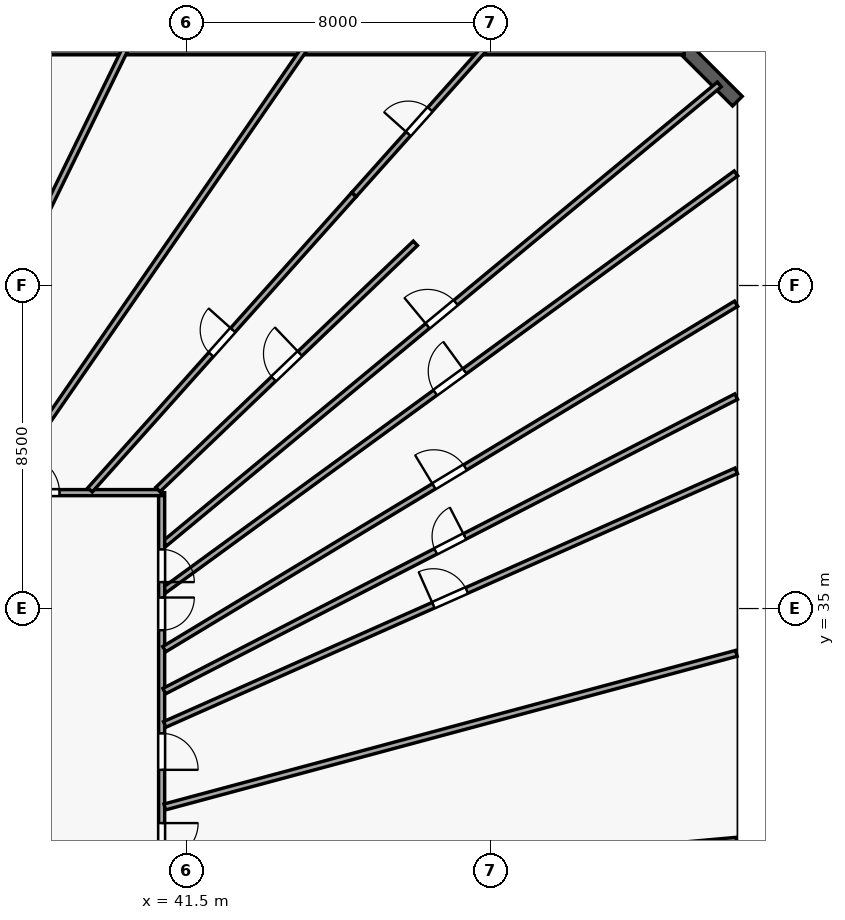
"""IFC4 building model, lengths in metres.
Left out: names, types, materials, properties, quantities, classifications, styles, units other than length and angle.
Written with IfcOpenShell. Run it as: python <this file> out.ifc"""

import sys

from ifc_helpers import new_model, si_unit, direction, frame, frame_2d, origin, origin_with_axes, origin_2d, place, context, subcontext, project, spatial, rectangle, circle, extrude, source, transform, mapped, element, fill, save


model = new_model("IFC4")
c1 = context("Model", 3, precision=1e-05, world=origin(), true_north=direction((0.0, 1.0)))
c2 = subcontext(c1, "Body", "Model", "MODEL_VIEW")
j1 = project(units=[si_unit("LENGTHUNIT", "METRE"), si_unit("PLANEANGLEUNIT", "RADIAN")], contexts=[c1])
p1 = place(None, origin())
s1 = spatial("IfcSite", under=j1, at=p1, CompositionType="ELEMENT")
p2 = place(p1, origin())
s2 = spatial("IfcBuilding", under=s1, at=p2, CompositionType="ELEMENT")
p3 = place(p2, frame((0.0, 0.0, 9.0)))
s3 = spatial("IfcBuildingStorey", under=s2, at=p3, CompositionType="ELEMENT", Elevation=9.0)
m1 = source(origin_with_axes(), c2, "Body", "SweptSolid", [
    extrude(circle(Radius=0.9, at=origin_2d()), origin(), (0.0, 0.0, 1.0), 4.5),
])
p4 = place(p3, frame((37.5, 34.7, 0.0), z_axis=(0.0, 0.0, 1.0), x_axis=(1.0, 0.0, 0.0)))
e1 = element("IfcColumn", 1, at=p4, inside=s3, PredefinedType="COLUMN", context=c2, shape_type="MappedRepresentation", body=[
    mapped(m1, transform((0.0, 0.0, 0.0), scale=1.0)),
])
m2 = source(origin_with_axes(), c2, "Body", "SweptSolid", [
    extrude(circle(Radius=0.8, at=origin_2d()), origin(), (0.0, 0.0, 1.0), 4.5),
])
p5 = place(p3, frame((46.8, 45.5, 0.0), z_axis=(0.0, 0.0, 1.0), x_axis=(1.0, 0.0, 0.0)))
e2 = element("IfcColumn", 2, at=p5, inside=s3, PredefinedType="COLUMN", context=c2, shape_type="MappedRepresentation", body=[
    mapped(m2, transform((0.0, 0.0, 0.0), scale=1.0)),
])
m3 = source(origin_with_axes(), c2, "Body", "SweptSolid", [
    extrude(rectangle(XDim=0.6, YDim=0.9, at=origin_2d()), origin(), (0.0, 0.0, 1.0), 4.5),
])
for number, where, z_axis, x_axis in (
    (3, (54.8, 34.5, 0.0), (0.0, 0.0, 1.0), (1.0, 0.0, 0.0)),
    (4, (54.8, 42.5, 0.0), (0.0, 0.0, 1.0), (1.0, 0.0, 0.0)),
):
    element("IfcColumn", number, at=place(p3, frame(where, z_axis=z_axis, x_axis=x_axis)), inside=s3, PredefinedType="PILASTER", context=c2, shape_type="MappedRepresentation", body=[
        mapped(m3, transform((0.0, 0.0, 0.0), scale=1.0)),
    ])
p6 = place(p3, frame((56.0, 48.35, 0.0), z_axis=(0.0, 0.0, 1.0), x_axis=(-0.707106781187, 0.707106781187, 0.0)))
e5 = element("IfcWall", 5, at=p6, inside=s3, PredefinedType="SOLIDWALL", context=c2, shape_type="SweptSolid", body=[
    extrude(rectangle(XDim=1.98, YDim=0.36, at=frame_2d((0.99, 0.0))), origin(), (0.0, 0.0, 1.0), 4.2),
])
p7 = place(p3, frame((54.6, 49.75, 0.0), z_axis=(0.0, 0.0, 1.0), x_axis=(-1.0, 0.0, 0.0)))
e6 = element("IfcWall", 6, at=p7, inside=s3, PredefinedType="SOLIDWALL", context=c2, shape_type="SweptSolid", body=[
    extrude(rectangle(XDim=49.25, YDim=0.36, at=frame_2d((24.625, 0.0))), origin(), (0.0, 0.0, 1.0), 4.2),
])
p8 = place(p7, frame((1.866, 0.0, 0.85)))
e7 = element("IfcOpeningElement", 7, at=p8, cuts=e6, PredefinedType="OPENING", context=c2, shape_type="SweptSolid", body=[
    extrude(rectangle(XDim=1.8, YDim=2.2, at=frame_2d((0.9, 1.1))), frame((0.0, 0.19, 0.0), z_axis=(0.0, -1.0, 0.0), x_axis=(1.0, 0.0, 0.0)), (0.0, 0.0, 1.0), 0.38),
])
p9 = place(p7, frame((6.763, 0.0, 0.85)))
e8 = element("IfcOpeningElement", 8, at=p9, cuts=e6, PredefinedType="OPENING", context=c2, shape_type="SweptSolid", body=[
    extrude(rectangle(XDim=1.8, YDim=2.2, at=frame_2d((0.9, 1.1))), frame((0.0, 0.19, 0.0), z_axis=(0.0, -1.0, 0.0), x_axis=(1.0, 0.0, 0.0)), (0.0, 0.0, 1.0), 0.38),
])
p10 = place(p7, frame((11.474, 0.0, 0.85)))
e9 = element("IfcOpeningElement", 9, at=p10, cuts=e6, PredefinedType="OPENING", context=c2, shape_type="SweptSolid", body=[
    extrude(rectangle(XDim=1.8, YDim=2.2, at=frame_2d((0.9, 1.1))), frame((0.0, 0.19, 0.0), z_axis=(0.0, -1.0, 0.0), x_axis=(1.0, 0.0, 0.0)), (0.0, 0.0, 1.0), 0.38),
])
p11 = place(p7, frame((16.083, 0.0, 0.85)))
e10 = element("IfcOpeningElement", 10, at=p11, cuts=e6, PredefinedType="OPENING", context=c2, shape_type="SweptSolid", body=[
    extrude(rectangle(XDim=1.8, YDim=2.2, at=frame_2d((0.9, 1.1))), frame((0.0, 0.19, 0.0), z_axis=(0.0, -1.0, 0.0), x_axis=(1.0, 0.0, 0.0)), (0.0, 0.0, 1.0), 0.38),
])
p12 = place(p7, frame((20.595, 0.0, 0.85)))
e11 = element("IfcOpeningElement", 11, at=p12, cuts=e6, PredefinedType="OPENING", context=c2, shape_type="SweptSolid", body=[
    extrude(rectangle(XDim=1.8, YDim=2.2, at=frame_2d((0.9, 1.1))), frame((0.0, 0.19, 0.0), z_axis=(0.0, -1.0, 0.0), x_axis=(1.0, 0.0, 0.0)), (0.0, 0.0, 1.0), 0.38),
])
p13 = place(p7, frame((24.23, 0.0, 0.85)))
e12 = element("IfcOpeningElement", 12, at=p13, cuts=e6, PredefinedType="OPENING", context=c2, shape_type="SweptSolid", body=[
    extrude(rectangle(XDim=1.8, YDim=2.2, at=frame_2d((0.9, 1.1))), frame((0.0, 0.19, 0.0), z_axis=(0.0, -1.0, 0.0), x_axis=(1.0, 0.0, 0.0)), (0.0, 0.0, 1.0), 0.38),
])
p14 = place(p7, frame((30.4, 0.0, 0.85)))
e13 = element("IfcOpeningElement", 13, at=p14, cuts=e6, PredefinedType="OPENING", context=c2, shape_type="SweptSolid", body=[
    extrude(rectangle(XDim=1.8, YDim=2.2, at=frame_2d((0.9, 1.1))), frame((0.0, 0.19, 0.0), z_axis=(0.0, -1.0, 0.0), x_axis=(1.0, 0.0, 0.0)), (0.0, 0.0, 1.0), 0.38),
])
p15 = place(p7, frame((35.42, 0.0, 0.85)))
e14 = element("IfcOpeningElement", 14, at=p15, cuts=e6, PredefinedType="OPENING", context=c2, shape_type="SweptSolid", body=[
    extrude(rectangle(XDim=1.8, YDim=2.2, at=frame_2d((0.9, 1.1))), frame((0.0, 0.19, 0.0), z_axis=(0.0, -1.0, 0.0), x_axis=(1.0, 0.0, 0.0)), (0.0, 0.0, 1.0), 0.38),
])
p16 = place(p7, frame((40.69, 0.0, 0.85)))
e15 = element("IfcOpeningElement", 15, at=p16, cuts=e6, PredefinedType="OPENING", context=c2, shape_type="SweptSolid", body=[
    extrude(rectangle(XDim=1.8, YDim=2.2, at=frame_2d((0.9, 1.1))), frame((0.0, 0.19, 0.0), z_axis=(0.0, -1.0, 0.0), x_axis=(1.0, 0.0, 0.0)), (0.0, 0.0, 1.0), 0.38),
])
p17 = place(p7, frame((45.58, 0.0, 0.85)))
e16 = element("IfcOpeningElement", 16, at=p17, cuts=e6, PredefinedType="OPENING", context=c2, shape_type="SweptSolid", body=[
    extrude(rectangle(XDim=1.8, YDim=2.2, at=frame_2d((0.9, 1.1))), frame((0.0, 0.19, 0.0), z_axis=(0.0, -1.0, 0.0), x_axis=(1.0, 0.0, 0.0)), (0.0, 0.0, 1.0), 0.38),
])
p18 = place(p3, frame((40.932, 36.712, 0.0), z_axis=(0.0, 0.0, 1.0), x_axis=(0.770350004389, 0.637621259635, 0.0)))
e17 = element("IfcWall", 17, at=p18, inside=s3, PredefinedType="PARTITIONING", context=c2, shape_type="SweptSolid", body=[
    extrude(rectangle(XDim=18.942, YDim=0.16, at=frame_2d((9.471, 0.0))), origin(), (0.0, 0.0, 1.0), 4.2),
])
p19 = place(p18, frame((8.979, 0.0, 0.0)))
e18 = element("IfcOpeningElement", 18, at=p19, cuts=e17, PredefinedType="OPENING", context=c2, shape_type="SweptSolid", body=[
    extrude(rectangle(XDim=0.96, YDim=2.15, at=frame_2d((0.48, 1.075))), frame((0.0, 0.09, 0.0), z_axis=(0.0, -1.0, 0.0), x_axis=(1.0, 0.0, 0.0)), (0.0, 0.0, 1.0), 0.18),
])
p20 = place(p3, frame((40.932, 35.49, 0.0), z_axis=(0.0, 0.0, 1.0), x_axis=(0.808014689356, 0.589162339076, 0.0)))
e19 = element("IfcWall", 19, at=p20, inside=s3, PredefinedType="PARTITIONING", context=c2, shape_type="SweptSolid", body=[
    extrude(rectangle(XDim=18.602, YDim=0.16, at=frame_2d((9.301, 0.0))), origin(), (0.0, 0.0, 1.0), 4.2),
])
p21 = place(p20, frame((8.808, 0.0, 0.0)))
e20 = element("IfcOpeningElement", 20, at=p21, cuts=e19, PredefinedType="OPENING", context=c2, shape_type="SweptSolid", body=[
    extrude(rectangle(XDim=0.96, YDim=2.15, at=frame_2d((0.48, 1.075))), frame((0.0, 0.09, 0.0), z_axis=(0.0, -1.0, 0.0), x_axis=(1.0, 0.0, 0.0)), (0.0, 0.0, 1.0), 0.18),
])
p22 = place(p3, frame((40.85, 38.05, 0.0), z_axis=(0.0, 0.0, 1.0), x_axis=(0.0, -1.0, 0.0)))
e21 = element("IfcWall", 21, at=p22, inside=s3, PredefinedType="PARTITIONING", context=c2, shape_type="SweptSolid", body=[
    extrude(rectangle(XDim=18.508, YDim=0.16, at=frame_2d((9.254, 0.0))), origin(), (0.0, 0.0, 1.0), 3.25),
])
p23 = place(p22, frame((13.87, 0.0, 0.0)))
e22 = element("IfcOpeningElement", 22, at=p23, cuts=e21, PredefinedType="OPENING", context=c2, shape_type="SweptSolid", body=[
    extrude(rectangle(XDim=0.96, YDim=2.15, at=frame_2d((0.48, 1.075))), frame((0.0, 0.09, 0.0), z_axis=(0.0, -1.0, 0.0), x_axis=(1.0, 0.0, 0.0)), (0.0, 0.0, 1.0), 0.18),
])
p24 = place(p22, frame((8.695, 0.0, 0.0)))
e23 = element("IfcOpeningElement", 23, at=p24, cuts=e21, PredefinedType="OPENING", context=c2, shape_type="SweptSolid", body=[
    extrude(rectangle(XDim=0.96, YDim=2.15, at=frame_2d((0.48, 1.075))), frame((0.0, 0.09, 0.0), z_axis=(0.0, -1.0, 0.0), x_axis=(1.0, 0.0, 0.0)), (0.0, 0.0, 1.0), 0.18),
])
p25 = place(p22, frame((6.334, 0.0, 0.0)))
e24 = element("IfcOpeningElement", 24, at=p25, cuts=e21, PredefinedType="OPENING", context=c2, shape_type="SweptSolid", body=[
    extrude(rectangle(XDim=0.96, YDim=2.15, at=frame_2d((0.48, 1.075))), frame((0.0, 0.09, 0.0), z_axis=(0.0, -1.0, 0.0), x_axis=(1.0, 0.0, 0.0)), (0.0, 0.0, 1.0), 0.18),
])
p26 = place(p22, frame((12.2, 0.0, 0.0)))
e25 = element("IfcOpeningElement", 25, at=p26, cuts=e21, PredefinedType="OPENING", context=c2, shape_type="SweptSolid", body=[
    extrude(rectangle(XDim=0.96, YDim=2.15, at=frame_2d((0.48, 1.075))), frame((0.0, 0.09, 0.0), z_axis=(0.0, -1.0, 0.0), x_axis=(1.0, 0.0, 0.0)), (0.0, 0.0, 1.0), 0.18),
])
p27 = place(p22, frame((2.76, 0.0, 0.0)))
e26 = element("IfcOpeningElement", 26, at=p27, cuts=e21, PredefinedType="OPENING", context=c2, shape_type="SweptSolid", body=[
    extrude(rectangle(XDim=0.86, YDim=2.04, at=frame_2d((0.43, 1.02))), frame((0.0, 0.09, 0.0), z_axis=(0.0, -1.0, 0.0), x_axis=(1.0, 0.0, 0.0)), (0.0, 0.0, 1.0), 0.18),
])
p28 = place(p22, frame((1.494, 0.0, 0.0)))
e27 = element("IfcOpeningElement", 27, at=p28, cuts=e21, PredefinedType="OPENING", context=c2, shape_type="SweptSolid", body=[
    extrude(rectangle(XDim=0.86, YDim=2.04, at=frame_2d((0.43, 1.02))), frame((0.0, 0.09, 0.0), z_axis=(0.0, -1.0, 0.0), x_axis=(1.0, 0.0, 0.0)), (0.0, 0.0, 1.0), 0.18),
])
p29 = place(p3, frame((40.919, 33.932, 0.0), z_axis=(0.0, 0.0, 1.0), x_axis=(0.855961001887, 0.517040388412, 0.0)))
e28 = element("IfcWall", 28, at=p29, inside=s3, PredefinedType="PARTITIONING", context=c2, shape_type="SweptSolid", body=[
    extrude(rectangle(XDim=17.579, YDim=0.16, at=frame_2d((8.789, 0.0))), origin(), (0.0, 0.0, 1.0), 4.2),
])
p30 = place(p29, frame((8.289, 0.0, 0.0)))
e29 = element("IfcOpeningElement", 29, at=p30, cuts=e28, PredefinedType="OPENING", context=c2, shape_type="SweptSolid", body=[
    extrude(rectangle(XDim=0.96, YDim=2.15, at=frame_2d((0.48, 1.075))), frame((0.0, 0.09, 0.0), z_axis=(0.0, -1.0, 0.0), x_axis=(1.0, 0.0, 0.0)), (0.0, 0.0, 1.0), 0.18),
])
p31 = place(p3, frame((40.919, 32.827, 0.0), z_axis=(0.0, 0.0, 1.0), x_axis=(0.8890624387, 0.457785954452, 0.0)))
e30 = element("IfcWall", 30, at=p31, inside=s3, PredefinedType="PARTITIONING", context=c2, shape_type="SweptSolid", body=[
    extrude(rectangle(XDim=16.927, YDim=0.16, at=frame_2d((8.464, 0.0))), origin(), (0.0, 0.0, 1.0), 4.2),
])
p32 = place(p31, frame((8.033, 0.0, 0.0)))
e31 = element("IfcOpeningElement", 31, at=p32, cuts=e30, PredefinedType="OPENING", context=c2, shape_type="SweptSolid", body=[
    extrude(rectangle(XDim=0.86, YDim=2.04, at=frame_2d((0.43, 1.02))), frame((0.0, 0.09, 0.0), z_axis=(0.0, -1.0, 0.0), x_axis=(1.0, 0.0, 0.0)), (0.0, 0.0, 1.0), 0.18),
])
p33 = place(p3, frame((40.932, 31.951, 0.0), z_axis=(0.0, 0.0, 1.0), x_axis=(0.914043329039, 0.405616558636, 0.0)))
e32 = element("IfcWall", 32, at=p33, inside=s3, PredefinedType="PARTITIONING", context=c2, shape_type="SweptSolid", body=[
    extrude(rectangle(XDim=16.452, YDim=0.16, at=frame_2d((8.226, 0.0))), origin(), (0.0, 0.0, 1.0), 4.2),
])
p34 = place(p33, frame((7.733, 0.0, 0.0)))
e33 = element("IfcOpeningElement", 33, at=p34, cuts=e32, PredefinedType="OPENING", context=c2, shape_type="SweptSolid", body=[
    extrude(rectangle(XDim=0.96, YDim=2.15, at=frame_2d((0.48, 1.075))), frame((0.0, 0.09, 0.0), z_axis=(0.0, -1.0, 0.0), x_axis=(1.0, 0.0, 0.0)), (0.0, 0.0, 1.0), 0.18),
])
p35 = place(p3, frame((40.932, 29.779, 0.0), z_axis=(0.0, 0.0, 1.0), x_axis=(0.96572887565, 0.259552959405, 0.0)))
e34 = element("IfcWall", 34, at=p35, inside=s3, PredefinedType="PARTITIONING", context=c2, shape_type="SweptSolid", body=[
    extrude(rectangle(XDim=15.575, YDim=0.16, at=frame_2d((7.787, 0.0))), origin(), (0.0, 0.0, 1.0), 3.7),
])
p36 = place(p3, frame((25.4, 38.05, 0.0), z_axis=(0.0, 0.0, 1.0), x_axis=(1.0, 0.0, 0.0)))
e35 = element("IfcWall", 35, at=p36, inside=s3, PredefinedType="PARTITIONING", context=c2, shape_type="SweptSolid", body=[
    extrude(rectangle(XDim=15.45, YDim=0.16, at=frame_2d((7.725, 0.0))), origin(), (0.0, 0.0, 1.0), 4.2),
])
p37 = place(p36, frame((11.802, 0.0, 0.0)))
e36 = element("IfcOpeningElement", 36, at=p37, cuts=e35, PredefinedType="OPENING", context=c2, shape_type="SweptSolid", body=[
    extrude(rectangle(XDim=0.96, YDim=2.15, at=frame_2d((0.48, 1.075))), frame((0.0, 0.09, 0.0), z_axis=(0.0, -1.0, 0.0), x_axis=(1.0, 0.0, 0.0)), (0.0, 0.0, 1.0), 0.18),
])
p38 = place(p36, frame((9.567, 0.0, 0.0)))
e37 = element("IfcOpeningElement", 37, at=p38, cuts=e35, PredefinedType="OPENING", context=c2, shape_type="SweptSolid", body=[
    extrude(rectangle(XDim=0.96, YDim=2.15, at=frame_2d((0.48, 1.075))), frame((0.0, 0.09, 0.0), z_axis=(0.0, -1.0, 0.0), x_axis=(1.0, 0.0, 0.0)), (0.0, 0.0, 1.0), 0.18),
])
p39 = place(p36, frame((7.25, 0.0, 0.0)))
e38 = element("IfcOpeningElement", 38, at=p39, cuts=e35, PredefinedType="OPENING", context=c2, shape_type="SweptSolid", body=[
    extrude(rectangle(XDim=0.96, YDim=2.15, at=frame_2d((0.48, 1.075))), frame((0.0, 0.09, 0.0), z_axis=(0.0, -1.0, 0.0), x_axis=(1.0, 0.0, 0.0)), (0.0, 0.0, 1.0), 0.18),
])
p40 = place(p36, frame((4.933, 0.0, 0.0)))
e39 = element("IfcOpeningElement", 39, at=p40, cuts=e35, PredefinedType="OPENING", context=c2, shape_type="SweptSolid", body=[
    extrude(rectangle(XDim=0.96, YDim=2.15, at=frame_2d((0.48, 1.075))), frame((0.0, 0.09, 0.0), z_axis=(0.0, -1.0, 0.0), x_axis=(1.0, 0.0, 0.0)), (0.0, 0.0, 1.0), 0.18),
])
p41 = place(p36, frame((1.698, 0.0, 0.0)))
e40 = element("IfcOpeningElement", 40, at=p41, cuts=e35, PredefinedType="OPENING", context=c2, shape_type="SweptSolid", body=[
    extrude(rectangle(XDim=0.96, YDim=2.15, at=frame_2d((0.48, 1.075))), frame((0.0, 0.09, 0.0), z_axis=(0.0, -1.0, 0.0), x_axis=(1.0, 0.0, 0.0)), (0.0, 0.0, 1.0), 0.18),
])
p42 = place(p36, frame((3.164, 0.0, 0.0)))
e41 = element("IfcOpeningElement", 41, at=p42, cuts=e35, PredefinedType="OPENING", context=c2, shape_type="SweptSolid", body=[
    extrude(rectangle(XDim=0.86, YDim=2.04, at=frame_2d((0.43, 1.02))), frame((0.0, 0.09, 0.0), z_axis=(0.0, -1.0, 0.0), x_axis=(1.0, 0.0, 0.0)), (0.0, 0.0, 1.0), 0.18),
])
p43 = place(p3, frame((40.932, 27.553, 0.0), z_axis=(0.0, 0.0, 1.0), x_axis=(0.996013941628, 0.08919769102, 0.0)))
e42 = element("IfcWall", 42, at=p43, inside=s3, PredefinedType="PARTITIONING", context=c2, shape_type="SweptSolid", body=[
    extrude(rectangle(XDim=15.103, YDim=0.16, at=frame_2d((7.552, 0.0))), origin(), (0.0, 0.0, 1.0), 3.7),
])
p44 = place(p3, frame((36.602, 38.132, 0.0), z_axis=(0.0, 0.0, 1.0), x_axis=(0.568083583137, 0.822970863743, 0.0)))
e43 = element("IfcWall", 43, at=p44, inside=s3, PredefinedType="PARTITIONING", context=c2, shape_type="SweptSolid", body=[
    extrude(rectangle(XDim=14.073, YDim=0.16, at=frame_2d((7.036, 0.0))), origin(), (0.0, 0.0, 1.0), 4.2),
])
p45 = place(p3, frame((34.233, 38.118, 0.0), z_axis=(0.0, 0.0, 1.0), x_axis=(0.438369218091, 0.898794986985, 0.0)))
e44 = element("IfcWall", 44, at=p45, inside=s3, PredefinedType="PARTITIONING", context=c2, shape_type="SweptSolid", body=[
    extrude(rectangle(XDim=12.906, YDim=0.16, at=frame_2d((6.453, 0.0))), origin(), (0.0, 0.0, 1.0), 4.2),
])
p46 = place(p3, frame((38.966, 38.121, 0.0), z_axis=(0.0, 0.0, 1.0), x_axis=(0.666343454818, 0.745644955875, 0.0)))
e45 = element("IfcWall", 45, at=p46, inside=s3, PredefinedType="PARTITIONING", context=c2, shape_type="SweptSolid", body=[
    extrude(rectangle(XDim=10.421, YDim=0.16, at=frame_2d((5.21, 0.0))), origin(), (0.0, 0.0, 1.0), 4.2),
])
p47 = place(p46, frame((4.781, 0.0, 0.0)))
e46 = element("IfcOpeningElement", 46, at=p47, cuts=e45, PredefinedType="OPENING", context=c2, shape_type="SweptSolid", body=[
    extrude(rectangle(XDim=0.86, YDim=2.04, at=frame_2d((0.43, 1.02))), frame((0.0, 0.09, 0.0), z_axis=(0.0, -1.0, 0.0), x_axis=(1.0, 0.0, 0.0)), (0.0, 0.0, 1.0), 0.18),
])
p48 = place(p3, frame((40.752, 38.132, 0.0), z_axis=(0.0, 0.0, 1.0), x_axis=(0.722765157253, 0.69109371829, 0.0)))
e47 = element("IfcWall", 47, at=p48, inside=s3, PredefinedType="PARTITIONING", context=c2, shape_type="SweptSolid", body=[
    extrude(rectangle(XDim=9.374, YDim=0.16, at=frame_2d((4.687, 0.0))), origin(), (0.0, 0.0, 1.0), 3.25),
])
p49 = place(p48, frame((4.212, 0.0, 0.0)))
e48 = element("IfcOpeningElement", 48, at=p49, cuts=e47, PredefinedType="OPENING", context=c2, shape_type="SweptSolid", body=[
    extrude(rectangle(XDim=0.96, YDim=2.15, at=frame_2d((0.48, 1.075))), frame((0.0, 0.09, 0.0), z_axis=(0.0, -1.0, 0.0), x_axis=(1.0, 0.0, 0.0)), (0.0, 0.0, 1.0), 0.18),
])
p50 = place(p3, frame((45.913, 45.895, 0.0), z_axis=(0.0, 0.0, 1.0), x_axis=(0.666346204372, 0.745642498735, 0.0)))
e49 = element("IfcWall", 49, at=p50, inside=s3, PredefinedType="PARTITIONING", context=c2, shape_type="SweptSolid", body=[
    extrude(rectangle(XDim=5.123, YDim=0.16, at=frame_2d((2.562, 0.0))), origin(), (0.0, 0.0, 1.0), 4.2),
])
p51 = place(p50, frame((2.142, 0.0, 0.0)))
e50 = element("IfcOpeningElement", 50, at=p51, cuts=e49, PredefinedType="OPENING", context=c2, shape_type="SweptSolid", body=[
    extrude(rectangle(XDim=0.86, YDim=2.04, at=frame_2d((0.43, 1.02))), frame((0.0, 0.09, 0.0), z_axis=(0.0, -1.0, 0.0), x_axis=(1.0, 0.0, 0.0)), (0.0, 0.0, 1.0), 0.18),
])
m4 = source(origin_with_axes(), c2, "Body", "SweptSolid", [
    extrude(rectangle(XDim=0.96, YDim=2.15, at=frame_2d((0.48, 1.075))), frame((0.0, 0.025, 0.0), z_axis=(0.0, -1.0, 0.0), x_axis=(1.0, 0.0, 0.0)), (0.0, 0.0, 1.0), 0.05),
])
p52 = place(p24, origin())
e51 = element("IfcDoor", 51, at=p52, inside=s3, OperationType="SINGLE_SWING_LEFT", PredefinedType="DOOR", context=c2, shape_type="MappedRepresentation", body=[
    mapped(m4, transform((0.0, 0.0, 0.0), scale=1.0)),
])
fill(e23, e51)
p53 = place(p25, origin())
e52 = element("IfcDoor", 52, at=p53, inside=s3, OperationType="SINGLE_SWING_RIGHT", PredefinedType="DOOR", context=c2, shape_type="MappedRepresentation", body=[
    mapped(m4, transform((0.0, 0.0, 0.0), scale=1.0)),
])
fill(e24, e52)
p54 = place(p34, origin())
e53 = element("IfcDoor", 53, at=p54, inside=s3, OperationType="SINGLE_SWING_LEFT", PredefinedType="DOOR", context=c2, shape_type="MappedRepresentation", body=[
    mapped(m4, transform((0.0, 0.0, 0.0), scale=1.0)),
])
fill(e33, e53)
p55 = place(p30, origin())
e54 = element("IfcDoor", 54, at=p55, inside=s3, OperationType="SINGLE_SWING_LEFT", PredefinedType="DOOR", context=c2, shape_type="MappedRepresentation", body=[
    mapped(m4, transform((0.0, 0.0, 0.0), scale=1.0)),
])
fill(e29, e54)
p56 = place(p21, origin())
e55 = element("IfcDoor", 55, at=p56, inside=s3, OperationType="SINGLE_SWING_RIGHT", PredefinedType="DOOR", context=c2, shape_type="MappedRepresentation", body=[
    mapped(m4, transform((0.0, 0.0, 0.0), scale=1.0)),
])
fill(e20, e55)
p57 = place(p19, origin())
e56 = element("IfcDoor", 56, at=p57, inside=s3, OperationType="SINGLE_SWING_LEFT", PredefinedType="DOOR", context=c2, shape_type="MappedRepresentation", body=[
    mapped(m4, transform((0.0, 0.0, 0.0), scale=1.0)),
])
fill(e18, e56)
p58 = place(p49, origin())
e57 = element("IfcDoor", 57, at=p58, inside=s3, OperationType="SINGLE_SWING_RIGHT", PredefinedType="DOOR", context=c2, shape_type="MappedRepresentation", body=[
    mapped(m4, transform((0.0, 0.0, 0.0), scale=1.0)),
])
fill(e48, e57)
p59 = place(p37, origin())
e58 = element("IfcDoor", 58, at=p59, inside=s3, OperationType="SINGLE_SWING_LEFT", PredefinedType="DOOR", context=c2, shape_type="MappedRepresentation", body=[
    mapped(m4, transform((0.0, 0.0, 0.0), scale=1.0)),
])
fill(e36, e58)
m5 = source(origin_with_axes(), c2, "Body", "SweptSolid", [
    extrude(rectangle(XDim=0.86, YDim=2.04, at=frame_2d((0.43, 1.02))), frame((0.0, 0.025, 0.0), z_axis=(0.0, -1.0, 0.0), x_axis=(1.0, 0.0, 0.0)), (0.0, 0.0, 1.0), 0.05),
])
p60 = place(p32, origin())
e59 = element("IfcDoor", 59, at=p60, inside=s3, OperationType="SINGLE_SWING_RIGHT", PredefinedType="DOOR", context=c2, shape_type="MappedRepresentation", body=[
    mapped(m5, transform((0.0, 0.0, 0.0), scale=1.0)),
])
fill(e31, e59)
p61 = place(p27, origin())
e60 = element("IfcDoor", 60, at=p61, inside=s3, OperationType="SINGLE_SWING_LEFT", PredefinedType="DOOR", context=c2, shape_type="MappedRepresentation", body=[
    mapped(m5, transform((0.0, 0.0, 0.0), scale=1.0)),
])
fill(e26, e60)
p62 = place(p28, origin())
e61 = element("IfcDoor", 61, at=p62, inside=s3, OperationType="SINGLE_SWING_RIGHT", PredefinedType="DOOR", context=c2, shape_type="MappedRepresentation", body=[
    mapped(m5, transform((0.0, 0.0, 0.0), scale=1.0)),
])
fill(e27, e61)
p63 = place(p51, origin())
e62 = element("IfcDoor", 62, at=p63, inside=s3, OperationType="SINGLE_SWING_LEFT", PredefinedType="DOOR", context=c2, shape_type="MappedRepresentation", body=[
    mapped(m5, transform((0.0, 0.0, 0.0), scale=1.0)),
])
fill(e50, e62)
p64 = place(p47, origin())
e63 = element("IfcDoor", 63, at=p64, inside=s3, OperationType="SINGLE_SWING_RIGHT", PredefinedType="DOOR", context=c2, shape_type="MappedRepresentation", body=[
    mapped(m5, transform((0.0, 0.0, 0.0), scale=1.0)),
])
fill(e46, e63)
save(model, sys.argv[1])
